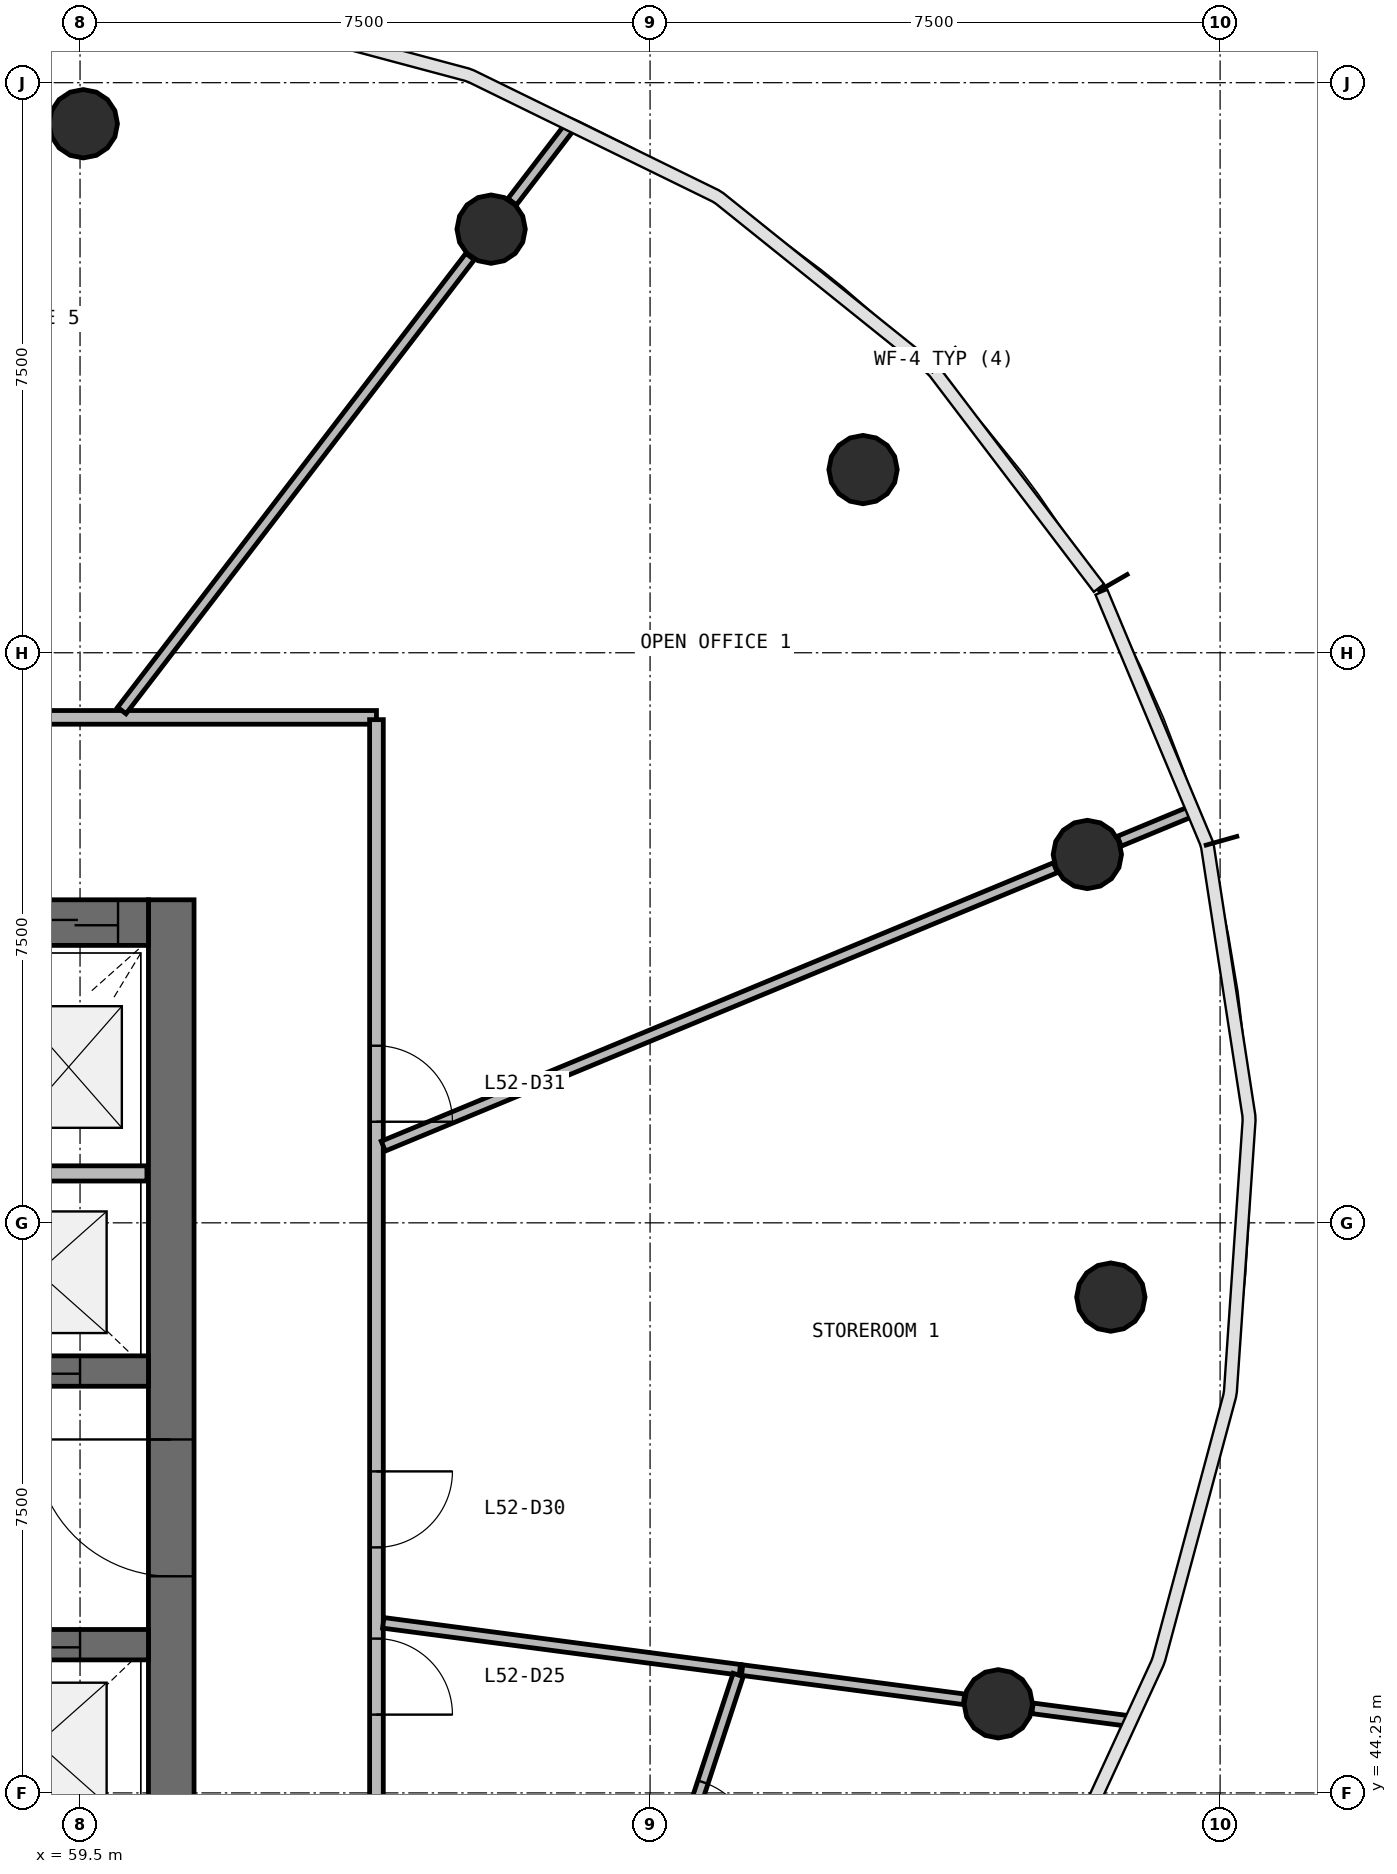
"""IFC4 building model, lengths in metres.
Left out: names, types, materials, properties, quantities, classifications, styles, units other than length and angle.
Written with IfcOpenShell. Run it as: python <this file> out.ifc"""

import sys

from ifc_helpers import new_model, si_unit, direction, frame, frame_2d, origin, origin_2d, place, context, subcontext, project, spatial, rectangle, circle, extrude, source, transform, mapped, element, fill, save


model = new_model("IFC4")
c1 = context("Model", 3, precision=1e-05, world=origin(), true_north=direction((0.0, 1.0)))
c2 = subcontext(c1, "Body", "Model", "MODEL_VIEW")
j1 = project(units=[si_unit("LENGTHUNIT", "METRE"), si_unit("PLANEANGLEUNIT", "RADIAN")], contexts=[c1])
p1 = place(None, origin())
s1 = spatial("IfcSite", under=j1, at=p1, CompositionType="ELEMENT")
p2 = place(p1, origin())
s2 = spatial("IfcBuilding", under=s1, at=p2, CompositionType="ELEMENT")
p3 = place(p2, frame((0.0, 0.0, 215.0)))
s3 = spatial("IfcBuildingStorey", under=s2, at=p3, CompositionType="ELEMENT", Elevation=215.0)
p4 = place(p3, frame((60.7, 40.0, 0.0), z_axis=(0.0, 0.0, 1.0), x_axis=(0.0, 1.0, 0.0)))
e1 = element("IfcWall", 1, at=p4, inside=s3, PredefinedType="SHEAR", context=c2, shape_type="SweptSolid", body=[
    extrude(rectangle(XDim=16.0, YDim=0.6, at=frame_2d((8.0, 0.0))), origin(), (0.0, 0.0, 1.0), 3.9),
])
p5 = place(p4, frame((7.1, 0.0, 0.0)))
e2 = element("IfcOpeningElement", 2, at=p5, cuts=e1, PredefinedType="OPENING", context=c2, shape_type="SweptSolid", body=[
    extrude(rectangle(XDim=1.8, YDim=2.1, at=frame_2d((0.9, 1.05))), frame((0.0, 0.31, 0.0), z_axis=(0.0, -1.0, 0.0), x_axis=(1.0, 0.0, 0.0)), (0.0, 0.0, 1.0), 0.62),
])
p6 = place(p3, frame((60.4, 55.7, 0.0), z_axis=(0.0, 0.0, 1.0), x_axis=(-1.0, 0.0, 0.0)))
e3 = element("IfcWall", 3, at=p6, inside=s3, PredefinedType="SHEAR", context=c2, shape_type="SweptSolid", body=[
    extrude(rectangle(XDim=16.8, YDim=0.6, at=frame_2d((8.4, 0.0))), origin(), (0.0, 0.0, 1.0), 3.9),
])
p7 = place(p6, frame((0.4, 0.0, 0.0)))
e4 = element("IfcOpeningElement", 4, at=p7, cuts=e3, PredefinedType="OPENING", context=c2, shape_type="SweptSolid", body=[
    extrude(rectangle(XDim=1.1, YDim=2.1, at=frame_2d((0.55, 1.05))), frame((0.0, 0.31, 0.0), z_axis=(0.0, -1.0, 0.0), x_axis=(1.0, 0.0, 0.0)), (0.0, 0.0, 1.0), 0.62),
])
p8 = place(p6, frame((10.3, 0.0, 0.0)))
e5 = element("IfcOpeningElement", 5, at=p8, cuts=e3, PredefinedType="OPENING", context=c2, shape_type="SweptSolid", body=[
    extrude(rectangle(XDim=1.2, YDim=2.1, at=frame_2d((0.6, 1.05))), frame((0.0, 0.31, 0.0), z_axis=(0.0, -1.0, 0.0), x_axis=(1.0, 0.0, 0.0)), (0.0, 0.0, 1.0), 0.62),
])
p9 = place(p6, frame((7.25, 0.0, 0.0)))
e6 = element("IfcOpeningElement", 6, at=p9, cuts=e3, PredefinedType="OPENING", context=c2, shape_type="SweptSolid", body=[
    extrude(rectangle(XDim=1.1, YDim=2.1, at=frame_2d((0.55, 1.05))), frame((0.0, 0.31, 0.0), z_axis=(0.0, -1.0, 0.0), x_axis=(1.0, 0.0, 0.0)), (0.0, 0.0, 1.0), 0.62),
])
p10 = place(p3, frame((43.6, 49.8, 0.0), z_axis=(0.0, 0.0, 1.0), x_axis=(1.0, 0.0, 0.0)))
e7 = element("IfcWall", 7, at=p10, inside=s3, PredefinedType="SHEAR", context=c2, shape_type="SweptSolid", body=[
    extrude(rectangle(XDim=16.8, YDim=0.4, at=frame_2d((8.4, 0.0))), origin(), (0.0, 0.0, 1.0), 3.9),
])
p11 = place(p10, frame((9.8, 0.0, 0.0)))
e8 = element("IfcOpeningElement", 8, at=p11, cuts=e7, PredefinedType="OPENING", context=c2, shape_type="SweptSolid", body=[
    extrude(rectangle(XDim=1.1, YDim=2.1, at=frame_2d((0.55, 1.05))), frame((0.0, 0.21, 0.0), z_axis=(0.0, -1.0, 0.0), x_axis=(1.0, 0.0, 0.0)), (0.0, 0.0, 1.0), 0.42),
])
p12 = place(p10, frame((12.3, 0.0, 0.0)))
e9 = element("IfcOpeningElement", 9, at=p12, cuts=e7, PredefinedType="OPENING", context=c2, shape_type="SweptSolid", body=[
    extrude(rectangle(XDim=1.1, YDim=2.1, at=frame_2d((0.55, 1.05))), frame((0.0, 0.21, 0.0), z_axis=(0.0, -1.0, 0.0), x_axis=(1.0, 0.0, 0.0)), (0.0, 0.0, 1.0), 0.42),
])
p13 = place(p10, frame((14.8, 0.0, 0.0)))
e10 = element("IfcOpeningElement", 10, at=p13, cuts=e7, PredefinedType="OPENING", context=c2, shape_type="SweptSolid", body=[
    extrude(rectangle(XDim=1.1, YDim=2.1, at=frame_2d((0.55, 1.05))), frame((0.0, 0.21, 0.0), z_axis=(0.0, -1.0, 0.0), x_axis=(1.0, 0.0, 0.0)), (0.0, 0.0, 1.0), 0.42),
])
p14 = place(p10, frame((2.05, 0.0, 0.0)))
e11 = element("IfcOpeningElement", 11, at=p14, cuts=e7, PredefinedType="OPENING", context=c2, shape_type="SweptSolid", body=[
    extrude(rectangle(XDim=0.9, YDim=2.1, at=frame_2d((0.45, 1.05))), frame((0.0, 0.21, 0.0), z_axis=(0.0, -1.0, 0.0), x_axis=(1.0, 0.0, 0.0)), (0.0, 0.0, 1.0), 0.42),
])
p15 = place(p10, frame((5.25, 0.0, 0.0)))
e12 = element("IfcOpeningElement", 12, at=p15, cuts=e7, PredefinedType="OPENING", context=c2, shape_type="SweptSolid", body=[
    extrude(rectangle(XDim=0.9, YDim=2.1, at=frame_2d((0.45, 1.05))), frame((0.0, 0.21, 0.0), z_axis=(0.0, -1.0, 0.0), x_axis=(1.0, 0.0, 0.0)), (0.0, 0.0, 1.0), 0.42),
])
p16 = place(p10, frame((7.85, 0.0, 0.0)))
e13 = element("IfcOpeningElement", 13, at=p16, cuts=e7, PredefinedType="OPENING", context=c2, shape_type="SweptSolid", body=[
    extrude(rectangle(XDim=0.9, YDim=2.1, at=frame_2d((0.45, 1.05))), frame((0.0, 0.21, 0.0), z_axis=(0.0, -1.0, 0.0), x_axis=(1.0, 0.0, 0.0)), (0.0, 0.0, 1.0), 0.42),
])
p17 = place(p3, frame((43.6, 46.2, 0.0), z_axis=(0.0, 0.0, 1.0), x_axis=(1.0, 0.0, 0.0)))
e14 = element("IfcWall", 14, at=p17, inside=s3, PredefinedType="SHEAR", context=c2, shape_type="SweptSolid", body=[
    extrude(rectangle(XDim=16.8, YDim=0.4, at=frame_2d((8.4, 0.0))), origin(), (0.0, 0.0, 1.0), 3.9),
])
p18 = place(p17, frame((9.8, 0.0, 0.0)))
e15 = element("IfcOpeningElement", 15, at=p18, cuts=e14, PredefinedType="OPENING", context=c2, shape_type="SweptSolid", body=[
    extrude(rectangle(XDim=1.1, YDim=2.1, at=frame_2d((0.55, 1.05))), frame((0.0, 0.21, 0.0), z_axis=(0.0, -1.0, 0.0), x_axis=(1.0, 0.0, 0.0)), (0.0, 0.0, 1.0), 0.42),
])
p19 = place(p17, frame((12.3, 0.0, 0.0)))
e16 = element("IfcOpeningElement", 16, at=p19, cuts=e14, PredefinedType="OPENING", context=c2, shape_type="SweptSolid", body=[
    extrude(rectangle(XDim=1.1, YDim=2.1, at=frame_2d((0.55, 1.05))), frame((0.0, 0.21, 0.0), z_axis=(0.0, -1.0, 0.0), x_axis=(1.0, 0.0, 0.0)), (0.0, 0.0, 1.0), 0.42),
])
p20 = place(p17, frame((14.8, 0.0, 0.0)))
e17 = element("IfcOpeningElement", 17, at=p20, cuts=e14, PredefinedType="OPENING", context=c2, shape_type="SweptSolid", body=[
    extrude(rectangle(XDim=1.1, YDim=2.1, at=frame_2d((0.55, 1.05))), frame((0.0, 0.21, 0.0), z_axis=(0.0, -1.0, 0.0), x_axis=(1.0, 0.0, 0.0)), (0.0, 0.0, 1.0), 0.42),
])
p21 = place(p17, frame((3.45, 0.0, 0.0)))
e18 = element("IfcOpeningElement", 18, at=p21, cuts=e14, PredefinedType="OPENING", context=c2, shape_type="SweptSolid", body=[
    extrude(rectangle(XDim=0.9, YDim=2.1, at=frame_2d((0.45, 1.05))), frame((0.0, 0.21, 0.0), z_axis=(0.0, -1.0, 0.0), x_axis=(1.0, 0.0, 0.0)), (0.0, 0.0, 1.0), 0.42),
])
p22 = place(p17, frame((7.85, 0.0, 0.0)))
e19 = element("IfcOpeningElement", 19, at=p22, cuts=e14, PredefinedType="OPENING", context=c2, shape_type="SweptSolid", body=[
    extrude(rectangle(XDim=0.9, YDim=2.1, at=frame_2d((0.45, 1.05))), frame((0.0, 0.21, 0.0), z_axis=(0.0, -1.0, 0.0), x_axis=(1.0, 0.0, 0.0)), (0.0, 0.0, 1.0), 0.42),
])
m1 = source(origin(), c2, "Body", "SweptSolid", [
    extrude(circle(Radius=0.45, at=origin_2d()), origin(), (0.0, 0.0, 1.0), 3.9),
])
for number, where, z_axis, x_axis in (
    (20, (73.062, 50.773, 0.0), (0.0, 0.0, 1.0), (1.0, 0.0, 0.0)),
    (21, (72.753, 56.596, 0.0), (0.0, 0.0, 1.0), (1.0, 0.0, 0.0)),
    (22, (69.802, 61.66, 0.0), (0.0, 0.0, 1.0), (1.0, 0.0, 0.0)),
    (23, (64.909, 64.823, 0.0), (0.0, 0.0, 1.0), (1.0, 0.0, 0.0)),
    (24, (59.543, 66.21, 0.0), (0.0, 0.0, 1.0), (1.0, 0.0, 0.0)),
    (25, (71.581, 45.422, 0.0), (0.0, 0.0, 1.0), (1.0, 0.0, 0.0)),
):
    element("IfcColumn", number, at=place(p3, frame(where, z_axis=z_axis, x_axis=x_axis)), inside=s3, PredefinedType="COLUMN", context=c2, shape_type="MappedRepresentation", body=[
        mapped(m1, transform((0.0, 0.0, 0.0), scale=1.0)),
    ])
p23 = place(p3, frame((60.38, 52.4, 0.0), z_axis=(0.0, 0.0, 1.0), x_axis=(-1.0, 0.0, 0.0)))
e26 = element("IfcWall", 26, at=p23, inside=s3, PredefinedType="SOLIDWALL", context=c2, shape_type="SweptSolid", body=[
    extrude(rectangle(XDim=1.85, YDim=0.2, at=frame_2d((0.925, 0.0))), origin(), (0.0, 0.0, 1.0), 3.58),
])
p24 = place(p3, frame((40.6, 58.4, 0.0), z_axis=(0.0, 0.0, 1.0), x_axis=(1.0, 0.0, 0.0)))
e27 = element("IfcWall", 27, at=p24, inside=s3, PredefinedType="PARTITIONING", context=c2, shape_type="SweptSolid", body=[
    extrude(rectangle(XDim=22.8, YDim=0.18, at=frame_2d((11.4, 0.0))), origin(), (0.0, 0.0, 1.0), 2.88),
])
p25 = place(p24, frame((12.95, 0.0, 0.0)))
e28 = element("IfcOpeningElement", 28, at=p25, cuts=e27, PredefinedType="OPENING", context=c2, shape_type="SweptSolid", body=[
    extrude(rectangle(XDim=1.0, YDim=2.1, at=frame_2d((0.5, 1.05))), frame((0.0, 0.1, 0.0), z_axis=(0.0, -1.0, 0.0), x_axis=(1.0, 0.0, 0.0)), (0.0, 0.0, 1.0), 0.2),
])
p26 = place(p24, frame((10.95, 0.0, 0.0)))
e29 = element("IfcOpeningElement", 29, at=p26, cuts=e27, PredefinedType="OPENING", context=c2, shape_type="SweptSolid", body=[
    extrude(rectangle(XDim=1.0, YDim=2.1, at=frame_2d((0.5, 1.05))), frame((0.0, 0.1, 0.0), z_axis=(0.0, -1.0, 0.0), x_axis=(1.0, 0.0, 0.0)), (0.0, 0.0, 1.0), 0.2),
])
p27 = place(p3, frame((63.4, 58.37, 0.0), z_axis=(0.0, 0.0, 1.0), x_axis=(0.0, -1.0, 0.0)))
e30 = element("IfcWall", 30, at=p27, inside=s3, PredefinedType="PARTITIONING", context=c2, shape_type="SweptSolid", body=[
    extrude(rectangle(XDim=20.74, YDim=0.18, at=frame_2d((10.37, 0.0))), origin(), (0.0, 0.0, 1.0), 2.88),
])
p28 = place(p27, frame((12.09, 0.0, 0.0)))
e31 = element("IfcOpeningElement", 31, at=p28, cuts=e30, PredefinedType="OPENING", context=c2, shape_type="SweptSolid", body=[
    extrude(rectangle(XDim=1.0, YDim=2.1, at=frame_2d((0.5, 1.05))), frame((0.0, 0.1, 0.0), z_axis=(0.0, -1.0, 0.0), x_axis=(1.0, 0.0, 0.0)), (0.0, 0.0, 1.0), 0.2),
])
p29 = place(p27, frame((9.89, 0.0, 0.0)))
e32 = element("IfcOpeningElement", 32, at=p29, cuts=e30, PredefinedType="OPENING", context=c2, shape_type="SweptSolid", body=[
    extrude(rectangle(XDim=1.0, YDim=2.1, at=frame_2d((0.5, 1.05))), frame((0.0, 0.1, 0.0), z_axis=(0.0, -1.0, 0.0), x_axis=(1.0, 0.0, 0.0)), (0.0, 0.0, 1.0), 0.2),
])
p30 = place(p27, frame((4.29, 0.0, 0.0)))
e33 = element("IfcOpeningElement", 33, at=p30, cuts=e30, PredefinedType="OPENING", context=c2, shape_type="SweptSolid", body=[
    extrude(rectangle(XDim=1.0, YDim=2.1, at=frame_2d((0.5, 1.05))), frame((0.0, 0.1, 0.0), z_axis=(0.0, -1.0, 0.0), x_axis=(1.0, 0.0, 0.0)), (0.0, 0.0, 1.0), 0.2),
])
p31 = place(p3, frame((63.49, 52.759, 0.0), z_axis=(0.0, 0.0, 1.0), x_axis=(0.923877866197, 0.382687455178, 0.0)))
e34 = element("IfcWall", 34, at=p31, inside=s3, PredefinedType="PARTITIONING", context=c2, shape_type="SweptSolid", body=[
    extrude(rectangle(XDim=9.571, YDim=0.14, at=frame_2d((4.786, 0.0))), origin(), (0.0, 0.0, 1.0), 2.88),
])
p32 = place(p3, frame((60.049, 58.49, 0.0), z_axis=(0.0, 0.0, 1.0), x_axis=(0.608758977351, 0.793355221508, 0.0)))
e35 = element("IfcWall", 35, at=p32, inside=s3, PredefinedType="PARTITIONING", context=c2, shape_type="SweptSolid", body=[
    extrude(rectangle(XDim=7.528, YDim=0.14, at=frame_2d((3.764, 0.0))), origin(), (0.0, 0.0, 1.0), 2.88),
])
p33 = place(p3, frame((63.49, 46.487, 0.0), z_axis=(0.0, 0.0, 1.0), x_axis=(0.99144375561, -0.130534591054, 0.0)))
e36 = element("IfcWall", 36, at=p33, inside=s3, PredefinedType="PARTITIONING", context=c2, shape_type="SweptSolid", body=[
    extrude(rectangle(XDim=4.732, YDim=0.14, at=frame_2d((2.366, 0.0))), origin(), (0.0, 0.0, 1.0), 2.88),
])
p34 = place(p3, frame((68.159, 45.802, 0.0), z_axis=(0.0, 0.0, 1.0), x_axis=(-0.312345892562, -0.94996844337, 0.0)))
e37 = element("IfcWall", 37, at=p34, inside=s3, PredefinedType="PARTITIONING", context=c2, shape_type="SweptSolid", body=[
    extrude(rectangle(XDim=4.135, YDim=0.14, at=frame_2d((2.067, 0.0))), origin(), (0.0, 0.0, 1.0), 2.88),
])
p35 = place(p34, frame((1.485, 0.0, 0.0)))
e38 = element("IfcOpeningElement", 38, at=p35, cuts=e37, PredefinedType="OPENING", context=c2, shape_type="SweptSolid", body=[
    extrude(rectangle(XDim=1.0, YDim=2.1, at=frame_2d((0.5, 1.05))), frame((0.0, 0.08, 0.0), z_axis=(0.0, -1.0, 0.0), x_axis=(1.0, 0.0, 0.0)), (0.0, 0.0, 1.0), 0.16),
])
p36 = place(p3, frame((68.211, 45.866, 0.0), z_axis=(0.0, 0.0, 1.0), x_axis=(0.991446673779, -0.1305124249, 0.0)))
e39 = element("IfcWall", 39, at=p36, inside=s3, PredefinedType="PARTITIONING", context=c2, shape_type="SweptSolid", body=[
    extrude(rectangle(XDim=2.944, YDim=0.14, at=frame_2d((1.472, 0.0))), origin(), (0.0, 0.0, 1.0), 2.88),
])
p37 = place(p3, frame((65.186, 65.184, 0.0), z_axis=(0.0, 0.0, 1.0), x_axis=(0.608673156435, 0.793421066417, 0.0)))
e40 = element("IfcWall", 40, at=p37, inside=s3, PredefinedType="PARTITIONING", context=c2, shape_type="SweptSolid", body=[
    extrude(rectangle(XDim=1.251, YDim=0.14, at=frame_2d((0.626, 0.0))), origin(), (0.0, 0.0, 1.0), 2.88),
])
p38 = place(p3, frame((72.031, 45.363, 0.0), z_axis=(0.0, 0.0, 1.0), x_axis=(0.991456301327, -0.1304392677, 0.0)))
e41 = element("IfcWall", 41, at=p38, inside=s3, PredefinedType="PARTITIONING", context=c2, shape_type="SweptSolid", body=[
    extrude(rectangle(XDim=1.243, YDim=0.14, at=frame_2d((0.621, 0.0))), origin(), (0.0, 0.0, 1.0), 2.88),
])
p39 = place(p3, frame((73.174, 56.77, 0.0), z_axis=(0.0, 0.0, 1.0), x_axis=(0.923833550204, 0.382794424617, 0.0)))
e42 = element("IfcWall", 42, at=p39, inside=s3, PredefinedType="PARTITIONING", context=c2, shape_type="SweptSolid", body=[
    extrude(rectangle(XDim=0.99, YDim=0.14, at=frame_2d((0.495, 0.0))), origin(), (0.0, 0.0, 1.0), 2.88),
])
m2 = source(origin(), c2, "Body", "SweptSolid", [
    extrude(rectangle(XDim=1.8, YDim=2.1, at=frame_2d((0.9, 1.05))), frame((0.0, 0.025, 0.0), z_axis=(0.0, -1.0, 0.0), x_axis=(1.0, 0.0, 0.0)), (0.0, 0.0, 1.0), 0.05),
])
p40 = place(p5, origin())
e43 = element("IfcDoor", 43, at=p40, inside=s3, OperationType="SINGLE_SWING_RIGHT", PredefinedType="DOOR", context=c2, shape_type="MappedRepresentation", body=[
    mapped(m2, transform((0.0, 0.0, 0.0), scale=1.0)),
])
fill(e2, e43)
m3 = source(origin(), c2, "Body", "SweptSolid", [
    extrude(rectangle(XDim=1.1, YDim=2.1, at=frame_2d((0.55, 1.05))), frame((0.0, 0.025, 0.0), z_axis=(0.0, -1.0, 0.0), x_axis=(1.0, 0.0, 0.0)), (0.0, 0.0, 1.0), 0.05),
])
p41 = place(p13, origin())
e44 = element("IfcDoor", 44, at=p41, inside=s3, OperationType="DOUBLE_DOOR_SLIDING", PredefinedType="USERDEFINED", context=c2, shape_type="MappedRepresentation", body=[
    mapped(m3, transform((0.0, 0.0, 0.0), scale=1.0)),
])
fill(e10, e44)
p42 = place(p20, origin())
e45 = element("IfcDoor", 45, at=p42, inside=s3, OperationType="DOUBLE_DOOR_SLIDING", PredefinedType="USERDEFINED", context=c2, shape_type="MappedRepresentation", body=[
    mapped(m3, transform((0.0, 0.0, 0.0), scale=1.0)),
])
fill(e17, e45)
p43 = place(p7, origin())
e46 = element("IfcDoor", 46, at=p43, inside=s3, OperationType="DOUBLE_DOOR_SLIDING", PredefinedType="USERDEFINED", context=c2, shape_type="MappedRepresentation", body=[
    mapped(m3, transform((0.0, 0.0, 0.0), scale=1.0)),
])
fill(e4, e46)
m4 = source(origin(), c2, "Body", "SweptSolid", [
    extrude(rectangle(XDim=1.0, YDim=2.1, at=frame_2d((0.5, 1.05))), frame((0.0, 0.025, 0.0), z_axis=(0.0, -1.0, 0.0), x_axis=(1.0, 0.0, 0.0)), (0.0, 0.0, 1.0), 0.05),
])
p44 = place(p28, origin())
e47 = element("IfcDoor", 47, at=p44, inside=s3, OperationType="SINGLE_SWING_RIGHT", PredefinedType="DOOR", context=c2, shape_type="MappedRepresentation", body=[
    mapped(m4, transform((0.0, 0.0, 0.0), scale=1.0)),
])
fill(e31, e47)
p45 = place(p35, origin())
e48 = element("IfcDoor", 48, at=p45, inside=s3, OperationType="SINGLE_SWING_RIGHT", PredefinedType="DOOR", context=c2, shape_type="MappedRepresentation", body=[
    mapped(m4, transform((0.0, 0.0, 0.0), scale=1.0)),
])
fill(e38, e48)
p46 = place(p29, origin())
e49 = element("IfcDoor", 49, at=p46, inside=s3, OperationType="SINGLE_SWING_LEFT", PredefinedType="DOOR", context=c2, shape_type="MappedRepresentation", body=[
    mapped(m4, transform((0.0, 0.0, 0.0), scale=1.0)),
])
fill(e32, e49)
p47 = place(p30, origin())
e50 = element("IfcDoor", 50, at=p47, inside=s3, OperationType="SINGLE_SWING_RIGHT", PredefinedType="DOOR", context=c2, shape_type="MappedRepresentation", body=[
    mapped(m4, transform((0.0, 0.0, 0.0), scale=1.0)),
])
fill(e33, e50)
save(model, sys.argv[1])
